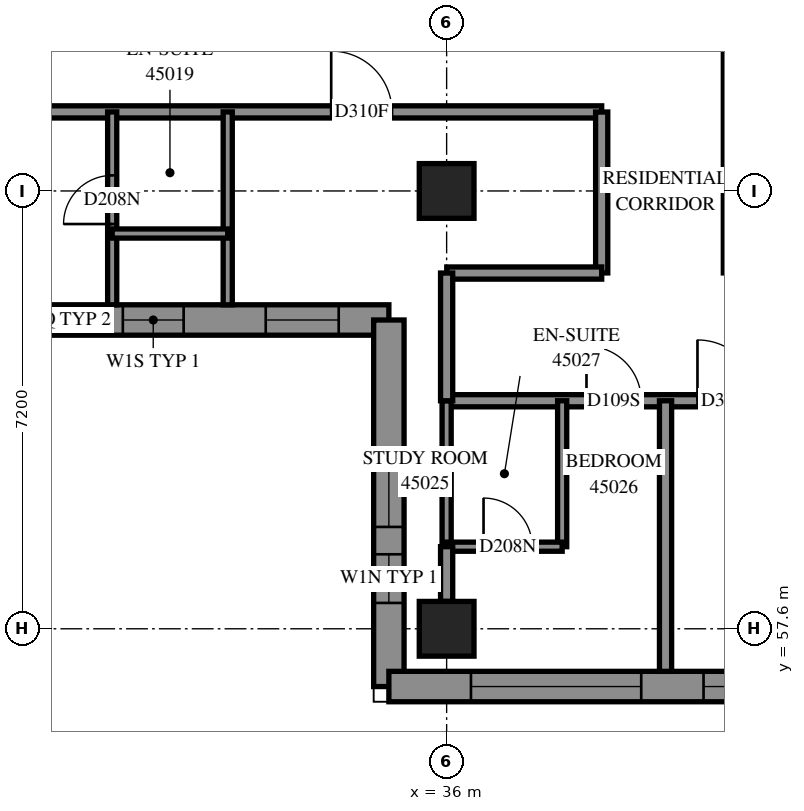
"""IFC4 building model, lengths in metres.
Left out: names, types, materials, properties, quantities, classifications, styles, units other than length and angle.
Written with IfcOpenShell. Run it as: python <this file> out.ifc"""

import sys

from ifc_helpers import new_model, si_unit, direction, frame, frame_2d, origin, origin_2d, place, context, subcontext, project, spatial, polyline, rectangle, outline, extrude, element, fill, save


model = new_model("IFC4")
c1 = context("Model", 3, precision=1e-05, world=origin(), true_north=direction((0.0, 1.0)))
c2 = subcontext(c1, "Body", "Model", "MODEL_VIEW")
j1 = project(units=[si_unit("LENGTHUNIT", "METRE"), si_unit("PLANEANGLEUNIT", "RADIAN")], contexts=[c1])
p1 = place(None, origin())
s1 = spatial("IfcSite", under=j1, at=p1, CompositionType="ELEMENT")
p2 = place(p1, origin())
s2 = spatial("IfcBuilding", under=s1, at=p2, CompositionType="ELEMENT")
p3 = place(p2, frame((0.0, 0.0, 166.0)))
s3 = spatial("IfcBuildingStorey", under=s2, at=p3, CompositionType="ELEMENT", Elevation=166.0)
for number, where, z_axis, x_axis in (
    (1, (36.0, 57.6, 0.0), (0.0, 0.0, 1.0), (1.0, 0.0, 0.0)),
    (2, (36.0, 64.8, 0.0), (0.0, 0.0, 1.0), (1.0, 0.0, 0.0)),
):
    element("IfcColumn", number, at=place(p3, frame(where, z_axis=z_axis, x_axis=x_axis)), inside=s3, PredefinedType="COLUMN", context=c2, shape_type="SweptSolid", body=[
        extrude(rectangle(XDim=0.9, YDim=0.9, at=origin_2d()), origin(), (0.0, 0.0, 1.0), 3.1),
    ])
p4 = place(p3, frame((19.478, 62.678, 0.0), z_axis=(0.0, 0.0, 1.0), x_axis=(1.0, 0.0, 0.0)))
e3 = element("IfcWall", 3, at=p4, inside=s3, PredefinedType="SOLIDWALL", context=c2, shape_type="SweptSolid", body=[
    extrude(outline(polyline([(-0.25, -0.25), (15.322, -0.25), (15.822, 0.25), (0.25, 0.25), (-0.25, -0.25)])), origin(), (0.0, 0.0, 1.0), 3.1),
])
p5 = place(p4, frame((2.522, 0.0, 0.45)))
e4 = element("IfcOpeningElement", 4, at=p5, cuts=e3, PredefinedType="OPENING", context=c2, shape_type="SweptSolid", body=[
    extrude(rectangle(XDim=2.8, YDim=2.5, at=frame_2d((1.4, 1.25))), frame((0.0, 0.26, 0.0), z_axis=(0.0, -1.0, 0.0), x_axis=(1.0, 0.0, 0.0)), (0.0, 0.0, 1.0), 0.52),
])
p6 = place(p4, frame((6.122, 0.0, 0.45)))
e5 = element("IfcOpeningElement", 5, at=p6, cuts=e3, PredefinedType="OPENING", context=c2, shape_type="SweptSolid", body=[
    extrude(rectangle(XDim=2.8, YDim=2.5, at=frame_2d((1.4, 1.25))), frame((0.0, 0.26, 0.0), z_axis=(0.0, -1.0, 0.0), x_axis=(1.0, 0.0, 0.0)), (0.0, 0.0, 1.0), 0.52),
])
p7 = place(p4, frame((0.686, 0.0, 0.45)))
e6 = element("IfcOpeningElement", 6, at=p7, cuts=e3, PredefinedType="OPENING", context=c2, shape_type="SweptSolid", body=[
    extrude(rectangle(XDim=1.2, YDim=2.5, at=frame_2d((0.6, 1.25))), frame((0.0, 0.26, 0.0), z_axis=(0.0, -1.0, 0.0), x_axis=(1.0, 0.0, 0.0)), (0.0, 0.0, 1.0), 0.52),
])
p8 = place(p4, frame((13.547, 0.0, 0.45)))
e7 = element("IfcOpeningElement", 7, at=p8, cuts=e3, PredefinedType="OPENING", context=c2, shape_type="SweptSolid", body=[
    extrude(rectangle(XDim=1.2, YDim=2.5, at=frame_2d((0.6, 1.25))), frame((0.0, 0.26, 0.0), z_axis=(0.0, -1.0, 0.0), x_axis=(1.0, 0.0, 0.0)), (0.0, 0.0, 1.0), 0.52),
])
p9 = place(p4, frame((9.547, 0.0, 0.45)))
e8 = element("IfcOpeningElement", 8, at=p9, cuts=e3, PredefinedType="OPENING", context=c2, shape_type="SweptSolid", body=[
    extrude(rectangle(XDim=1.3, YDim=2.5, at=frame_2d((0.65, 1.25))), frame((0.0, 0.26, 0.0), z_axis=(0.0, -1.0, 0.0), x_axis=(1.0, 0.0, 0.0)), (0.0, 0.0, 1.0), 0.52),
])
p10 = place(p4, frame((11.197, 0.0, 0.45)))
e9 = element("IfcOpeningElement", 9, at=p10, cuts=e3, PredefinedType="OPENING", context=c2, shape_type="SweptSolid", body=[
    extrude(rectangle(XDim=1.0, YDim=2.5, at=frame_2d((0.5, 1.25))), frame((0.0, 0.26, 0.0), z_axis=(0.0, -1.0, 0.0), x_axis=(1.0, 0.0, 0.0)), (0.0, 0.0, 1.0), 0.52),
])
p11 = place(p3, frame((35.05, 62.678, 0.0), z_axis=(0.0, 0.0, 1.0), x_axis=(0.0, -1.0, 0.0)))
e10 = element("IfcWall", 10, at=p11, inside=s3, PredefinedType="SOLIDWALL", context=c2, shape_type="SweptSolid", body=[
    extrude(outline(polyline([(0.25, -0.25), (6.278, -0.25), (5.778, 0.25), (-0.25, 0.25), (0.25, -0.25)])), origin(), (0.0, 0.0, 1.0), 3.1),
])
p12 = place(p11, frame((2.103, 0.0, 0.45)))
e11 = element("IfcOpeningElement", 11, at=p12, cuts=e10, PredefinedType="OPENING", context=c2, shape_type="SweptSolid", body=[
    extrude(rectangle(XDim=1.3, YDim=2.5, at=frame_2d((0.65, 1.25))), frame((0.0, 0.26, 0.0), z_axis=(0.0, -1.0, 0.0), x_axis=(1.0, 0.0, 0.0)), (0.0, 0.0, 1.0), 0.52),
])
p13 = place(p11, frame((3.853, 0.0, 0.45)))
e12 = element("IfcOpeningElement", 12, at=p13, cuts=e10, PredefinedType="OPENING", context=c2, shape_type="SweptSolid", body=[
    extrude(rectangle(XDim=0.8, YDim=2.5, at=frame_2d((0.4, 1.25))), frame((0.0, 0.26, 0.0), z_axis=(0.0, -1.0, 0.0), x_axis=(1.0, 0.0, 0.0)), (0.0, 0.0, 1.0), 0.52),
])
p14 = place(p3, frame((35.05, 56.65, 0.0), z_axis=(0.0, 0.0, 1.0), x_axis=(1.0, 0.0, 0.0)))
e13 = element("IfcWall", 13, at=p14, inside=s3, PredefinedType="SOLIDWALL", context=c2, shape_type="SweptSolid", body=[
    extrude(outline(polyline([(-0.25, -0.25), (6.95, -0.25), (7.45, 0.25), (0.25, 0.25), (-0.25, -0.25)])), origin(), (0.0, 0.0, 1.0), 3.1),
])
p15 = place(p14, frame((1.35, 0.0, 0.45)))
e14 = element("IfcOpeningElement", 14, at=p15, cuts=e13, PredefinedType="OPENING", context=c2, shape_type="SweptSolid", body=[
    extrude(rectangle(XDim=2.8, YDim=2.5, at=frame_2d((1.4, 1.25))), frame((0.0, 0.26, 0.0), z_axis=(0.0, -1.0, 0.0), x_axis=(1.0, 0.0, 0.0)), (0.0, 0.0, 1.0), 0.52),
])
p16 = place(p14, frame((5.175, 0.0, 0.45)))
e15 = element("IfcOpeningElement", 15, at=p16, cuts=e13, PredefinedType="OPENING", context=c2, shape_type="SweptSolid", body=[
    extrude(rectangle(XDim=1.2, YDim=2.5, at=frame_2d((0.6, 1.25))), frame((0.0, 0.26, 0.0), z_axis=(0.0, -1.0, 0.0), x_axis=(1.0, 0.0, 0.0)), (0.0, 0.0, 1.0), 0.52),
])
p17 = place(p3, frame((36.0, 61.35, 0.0), z_axis=(0.0, 0.0, 1.0), x_axis=(1.0, 0.0, 0.0)))
e16 = element("IfcWall", 16, at=p17, inside=s3, PredefinedType="PARTITIONING", context=c2, shape_type="SweptSolid", body=[
    extrude(rectangle(XDim=16.95, YDim=0.2, at=frame_2d((8.475, 0.0))), origin(), (0.0, 0.0, 1.0), 3.1),
])
p18 = place(p17, frame((2.3, 0.0, 0.0)))
e17 = element("IfcOpeningElement", 17, at=p18, cuts=e16, PredefinedType="OPENING", context=c2, shape_type="SweptSolid", body=[
    extrude(rectangle(XDim=0.9, YDim=2.1, at=frame_2d((0.45, 1.05))), frame((0.0, 0.11, 0.0), z_axis=(0.0, -1.0, 0.0), x_axis=(1.0, 0.0, 0.0)), (0.0, 0.0, 1.0), 0.22),
])
p19 = place(p17, frame((4.125, 0.0, 0.0)))
e18 = element("IfcOpeningElement", 18, at=p19, cuts=e16, PredefinedType="OPENING", context=c2, shape_type="SweptSolid", body=[
    extrude(rectangle(XDim=1.0, YDim=2.1, at=frame_2d((0.5, 1.05))), frame((0.0, 0.11, 0.0), z_axis=(0.0, -1.0, 0.0), x_axis=(1.0, 0.0, 0.0)), (0.0, 0.0, 1.0), 0.22),
])
p20 = place(p17, frame((9.5, 0.0, 0.0)))
e19 = element("IfcOpeningElement", 19, at=p20, cuts=e16, PredefinedType="OPENING", context=c2, shape_type="SweptSolid", body=[
    extrude(rectangle(XDim=0.9, YDim=2.1, at=frame_2d((0.45, 1.05))), frame((0.0, 0.11, 0.0), z_axis=(0.0, -1.0, 0.0), x_axis=(1.0, 0.0, 0.0)), (0.0, 0.0, 1.0), 0.22),
])
p21 = place(p17, frame((11.635, 0.0, 0.0)))
e20 = element("IfcOpeningElement", 20, at=p21, cuts=e16, PredefinedType="OPENING", context=c2, shape_type="SweptSolid", body=[
    extrude(rectangle(XDim=1.0, YDim=2.1, at=frame_2d((0.5, 1.05))), frame((0.0, 0.11, 0.0), z_axis=(0.0, -1.0, 0.0), x_axis=(1.0, 0.0, 0.0)), (0.0, 0.0, 1.0), 0.22),
])
p22 = place(p17, frame((15.803, 0.0, 0.0)))
e21 = element("IfcOpeningElement", 21, at=p22, cuts=e16, PredefinedType="OPENING", context=c2, shape_type="SweptSolid", body=[
    extrude(rectangle(XDim=1.0, YDim=2.1, at=frame_2d((0.5, 1.05))), frame((0.0, 0.11, 0.0), z_axis=(0.0, -1.0, 0.0), x_axis=(1.0, 0.0, 0.0)), (0.0, 0.0, 1.0), 0.22),
])
p23 = place(p3, frame((21.6, 66.1, 0.0), z_axis=(0.0, 0.0, 1.0), x_axis=(1.0, 0.0, 0.0)))
e22 = element("IfcWall", 22, at=p23, inside=s3, PredefinedType="PARTITIONING", context=c2, shape_type="SweptSolid", body=[
    extrude(rectangle(XDim=16.95, YDim=0.2, at=frame_2d((8.475, 0.0))), origin(), (0.0, 0.0, 1.0), 3.1),
])
p24 = place(p23, frame((0.546, 0.0, 0.0)))
e23 = element("IfcOpeningElement", 23, at=p24, cuts=e22, PredefinedType="OPENING", context=c2, shape_type="SweptSolid", body=[
    extrude(rectangle(XDim=0.9, YDim=2.1, at=frame_2d((0.45, 1.05))), frame((0.0, 0.11, 0.0), z_axis=(0.0, -1.0, 0.0), x_axis=(1.0, 0.0, 0.0)), (0.0, 0.0, 1.0), 0.22),
])
p25 = place(p23, frame((12.502, 0.0, 0.0)))
e24 = element("IfcOpeningElement", 24, at=p25, cuts=e22, PredefinedType="OPENING", context=c2, shape_type="SweptSolid", body=[
    extrude(rectangle(XDim=1.0, YDim=2.1, at=frame_2d((0.5, 1.05))), frame((0.0, 0.11, 0.0), z_axis=(0.0, -1.0, 0.0), x_axis=(1.0, 0.0, 0.0)), (0.0, 0.0, 1.0), 0.22),
])
p26 = place(p3, frame((40.65, 63.452, 0.0), z_axis=(0.0, 0.0, 1.0), x_axis=(0.0, 1.0, 0.0)))
e25 = element("IfcWall", 25, at=p26, inside=s3, PredefinedType="PARTITIONING", context=c2, shape_type="SweptSolid", body=[
    extrude(rectangle(XDim=4.748, YDim=0.2, at=frame_2d((2.374, 0.0))), origin(), (0.0, 0.0, 1.0), 3.1),
])
p27 = place(p3, frame((39.6, 56.9, 0.0), z_axis=(0.0, 0.0, 1.0), x_axis=(0.0, 1.0, 0.0)))
e26 = element("IfcWall", 26, at=p27, inside=s3, PredefinedType="PARTITIONING", context=c2, shape_type="SweptSolid", body=[
    extrude(rectangle(XDim=4.45, YDim=0.2, at=frame_2d((2.225, 0.0))), origin(), (0.0, 0.0, 1.0), 3.1),
])
p28 = place(p3, frame((32.4, 62.928, 0.0), z_axis=(0.0, 0.0, 1.0), x_axis=(0.0, 1.0, 0.0)))
e27 = element("IfcWall", 27, at=p28, inside=s3, PredefinedType="PARTITIONING", context=c2, shape_type="SweptSolid", body=[
    extrude(rectangle(XDim=3.172, YDim=0.15, at=frame_2d((1.586, 0.0))), origin(), (0.0, 0.0, 1.0), 3.1),
])
p29 = place(p3, frame((30.5, 62.928, 0.0), z_axis=(0.0, 0.0, 1.0), x_axis=(0.0, 1.0, 0.0)))
e28 = element("IfcWall", 28, at=p29, inside=s3, PredefinedType="PARTITIONING", context=c2, shape_type="SweptSolid", body=[
    extrude(rectangle(XDim=3.172, YDim=0.15, at=frame_2d((1.586, 0.0))), origin(), (0.0, 0.0, 1.0), 3.1),
])
p30 = place(p29, frame((1.328, 0.0, 0.0)))
e29 = element("IfcOpeningElement", 29, at=p30, cuts=e28, PredefinedType="OPENING", context=c2, shape_type="SweptSolid", body=[
    extrude(rectangle(XDim=0.8, YDim=2.1, at=frame_2d((0.4, 1.05))), frame((0.0, 0.085, 0.0), z_axis=(0.0, -1.0, 0.0), x_axis=(1.0, 0.0, 0.0)), (0.0, 0.0, 1.0), 0.17),
])
p31 = place(p3, frame((38.55, 63.452, 0.0), z_axis=(0.0, 0.0, 1.0), x_axis=(0.0, 1.0, 0.0)))
e30 = element("IfcWall", 30, at=p31, inside=s3, PredefinedType="PARTITIONING", context=c2, shape_type="SweptSolid", body=[
    extrude(rectangle(XDim=2.646, YDim=0.2, at=frame_2d((1.323, 0.0))), origin(), (0.0, 0.0, 1.0), 3.1),
])
p32 = place(p3, frame((36.002, 63.45, 0.0), z_axis=(0.0, 0.0, 1.0), x_axis=(1.0, 0.0, 0.0)))
e31 = element("IfcWall", 31, at=p32, inside=s3, PredefinedType="PARTITIONING", context=c2, shape_type="SweptSolid", body=[
    extrude(rectangle(XDim=2.548, YDim=0.2, at=frame_2d((1.274, 0.0))), origin(), (0.0, 0.0, 1.0), 3.1),
])
p33 = place(p3, frame((37.9, 58.95, 0.0), z_axis=(0.0, 0.0, 1.0), x_axis=(0.0, 1.0, 0.0)))
e32 = element("IfcWall", 32, at=p33, inside=s3, PredefinedType="PARTITIONING", context=c2, shape_type="SweptSolid", body=[
    extrude(rectangle(XDim=2.4, YDim=0.15, at=frame_2d((1.2, 0.0))), origin(), (0.0, 0.0, 1.0), 3.1),
])
p34 = place(p3, frame((36.0, 58.95, 0.0), z_axis=(0.0, 0.0, 1.0), x_axis=(0.0, 1.0, 0.0)))
e33 = element("IfcWall", 33, at=p34, inside=s3, PredefinedType="PARTITIONING", context=c2, shape_type="SweptSolid", body=[
    extrude(rectangle(XDim=2.4, YDim=0.15, at=frame_2d((1.2, 0.0))), origin(), (0.0, 0.0, 1.0), 2.6),
])
p35 = place(p3, frame((36.0, 61.35, 0.0), z_axis=(0.0, 0.0, 1.0), x_axis=(0.0, 1.0, 0.0)))
e34 = element("IfcWall", 34, at=p35, inside=s3, PredefinedType="PARTITIONING", context=c2, shape_type="SweptSolid", body=[
    extrude(rectangle(XDim=2.1, YDim=0.2, at=frame_2d((1.05, 0.0))), origin(), (0.0, 0.0, 1.0), 2.6),
])
p36 = place(p3, frame((30.5, 64.1, 0.0), z_axis=(0.0, 0.0, 1.0), x_axis=(1.0, 0.0, 0.0)))
e35 = element("IfcWall", 35, at=p36, inside=s3, PredefinedType="PARTITIONING", context=c2, shape_type="SweptSolid", body=[
    extrude(rectangle(XDim=1.9, YDim=0.15, at=frame_2d((0.95, 0.0))), origin(), (0.0, 0.0, 1.0), 3.1),
])
p37 = place(p3, frame((36.0, 58.95, 0.0), z_axis=(0.0, 0.0, 1.0), x_axis=(1.0, 0.0, 0.0)))
e36 = element("IfcWall", 36, at=p37, inside=s3, PredefinedType="PARTITIONING", context=c2, shape_type="SweptSolid", body=[
    extrude(rectangle(XDim=1.9, YDim=0.15, at=frame_2d((0.95, 0.0))), origin(), (0.0, 0.0, 1.0), 3.1),
])
p38 = place(p37, frame((0.607, 0.0, 0.0)))
e37 = element("IfcOpeningElement", 37, at=p38, cuts=e36, PredefinedType="OPENING", context=c2, shape_type="SweptSolid", body=[
    extrude(rectangle(XDim=0.8, YDim=2.1, at=frame_2d((0.4, 1.05))), frame((0.0, 0.085, 0.0), z_axis=(0.0, -1.0, 0.0), x_axis=(1.0, 0.0, 0.0)), (0.0, 0.0, 1.0), 0.17),
])
p39 = place(p3, frame((36.0, 58.05, 0.0), z_axis=(0.0, 0.0, 1.0), x_axis=(0.0, 1.0, 0.0)))
e38 = element("IfcWall", 38, at=p39, inside=s3, PredefinedType="PARTITIONING", context=c2, shape_type="SweptSolid", body=[
    extrude(rectangle(XDim=0.9, YDim=0.2, at=frame_2d((0.45, 0.0))), origin(), (0.0, 0.0, 1.0), 2.6),
])
p40 = place(p8, origin())
e39 = element("IfcWindow", 39, at=p40, inside=s3, PartitioningType="SINGLE_PANEL", PredefinedType="WINDOW", context=c2, shape_type="SweptSolid", body=[
    extrude(rectangle(XDim=1.2, YDim=2.5, at=frame_2d((0.6, 1.25))), frame((0.0, 0.18, 0.0), z_axis=(0.0, -1.0, 0.0), x_axis=(1.0, 0.0, 0.0)), (0.0, 0.0, 1.0), 0.06),
])
fill(e7, e39)
p41 = place(p15, origin())
e40 = element("IfcWindow", 40, at=p41, inside=s3, PartitioningType="SINGLE_PANEL", PredefinedType="WINDOW", context=c2, shape_type="SweptSolid", body=[
    extrude(rectangle(XDim=2.8, YDim=2.5, at=frame_2d((1.4, 1.25))), frame((0.0, 0.18, 0.0), z_axis=(0.0, -1.0, 0.0), x_axis=(1.0, 0.0, 0.0)), (0.0, 0.0, 1.0), 0.06),
])
fill(e14, e40)
p42 = place(p16, origin())
e41 = element("IfcWindow", 41, at=p42, inside=s3, PartitioningType="SINGLE_PANEL", PredefinedType="WINDOW", context=c2, shape_type="SweptSolid", body=[
    extrude(rectangle(XDim=1.2, YDim=2.5, at=frame_2d((0.6, 1.25))), frame((0.0, 0.18, 0.0), z_axis=(0.0, -1.0, 0.0), x_axis=(1.0, 0.0, 0.0)), (0.0, 0.0, 1.0), 0.06),
])
fill(e15, e41)
p43 = place(p30, origin())
e42 = element("IfcDoor", 42, at=p43, inside=s3, OperationType="SINGLE_SWING_RIGHT", PredefinedType="DOOR", context=c2, shape_type="SweptSolid", body=[
    extrude(rectangle(XDim=0.8, YDim=2.1, at=frame_2d((0.4, 1.05))), frame((0.0, 0.025, 0.0), z_axis=(0.0, -1.0, 0.0), x_axis=(1.0, 0.0, 0.0)), (0.0, 0.0, 1.0), 0.05),
])
fill(e29, e42)
p44 = place(p25, origin())
e43 = element("IfcDoor", 43, at=p44, inside=s3, OperationType="SINGLE_SWING_RIGHT", PredefinedType="DOOR", context=c2, shape_type="SweptSolid", body=[
    extrude(rectangle(XDim=1.0, YDim=2.1, at=frame_2d((0.5, 1.05))), frame((0.0, 0.025, 0.0), z_axis=(0.0, -1.0, 0.0), x_axis=(1.0, 0.0, 0.0)), (0.0, 0.0, 1.0), 0.05),
])
fill(e24, e43)
p45 = place(p18, origin())
e44 = element("IfcDoor", 44, at=p45, inside=s3, OperationType="SINGLE_SWING_LEFT", PredefinedType="DOOR", context=c2, shape_type="SweptSolid", body=[
    extrude(rectangle(XDim=0.9, YDim=2.1, at=frame_2d((0.45, 1.05))), frame((0.0, 0.025, 0.0), z_axis=(0.0, -1.0, 0.0), x_axis=(1.0, 0.0, 0.0)), (0.0, 0.0, 1.0), 0.05),
])
fill(e17, e44)
p46 = place(p38, origin())
e45 = element("IfcDoor", 45, at=p46, inside=s3, OperationType="SINGLE_SWING_RIGHT", PredefinedType="DOOR", context=c2, shape_type="SweptSolid", body=[
    extrude(rectangle(XDim=0.8, YDim=2.1, at=frame_2d((0.4, 1.05))), frame((0.0, 0.025, 0.0), z_axis=(0.0, -1.0, 0.0), x_axis=(1.0, 0.0, 0.0)), (0.0, 0.0, 1.0), 0.05),
])
fill(e37, e45)
p47 = place(p19, origin())
e46 = element("IfcDoor", 46, at=p47, inside=s3, OperationType="SINGLE_SWING_RIGHT", PredefinedType="DOOR", context=c2, shape_type="SweptSolid", body=[
    extrude(rectangle(XDim=1.0, YDim=2.1, at=frame_2d((0.5, 1.05))), frame((0.0, 0.025, 0.0), z_axis=(0.0, -1.0, 0.0), x_axis=(1.0, 0.0, 0.0)), (0.0, 0.0, 1.0), 0.05),
])
fill(e18, e46)
p48 = place(p9, origin())
e47 = element("IfcWindow", 47, at=p48, inside=s3, PartitioningType="SINGLE_PANEL", PredefinedType="WINDOW", context=c2, shape_type="SweptSolid", body=[
    extrude(rectangle(XDim=1.3, YDim=2.5, at=frame_2d((0.65, 1.25))), frame((0.0, 0.18, 0.0), z_axis=(0.0, -1.0, 0.0), x_axis=(1.0, 0.0, 0.0)), (0.0, 0.0, 1.0), 0.06),
])
fill(e8, e47)
p49 = place(p10, origin())
e48 = element("IfcWindow", 48, at=p49, inside=s3, PartitioningType="SINGLE_PANEL", PredefinedType="WINDOW", context=c2, shape_type="SweptSolid", body=[
    extrude(rectangle(XDim=1.0, YDim=2.5, at=frame_2d((0.5, 1.25))), frame((0.0, 0.18, 0.0), z_axis=(0.0, -1.0, 0.0), x_axis=(1.0, 0.0, 0.0)), (0.0, 0.0, 1.0), 0.06),
])
fill(e9, e48)
p50 = place(p12, origin())
e49 = element("IfcWindow", 49, at=p50, inside=s3, PartitioningType="SINGLE_PANEL", PredefinedType="WINDOW", context=c2, shape_type="SweptSolid", body=[
    extrude(rectangle(XDim=1.3, YDim=2.5, at=frame_2d((0.65, 1.25))), frame((0.0, 0.18, 0.0), z_axis=(0.0, -1.0, 0.0), x_axis=(1.0, 0.0, 0.0)), (0.0, 0.0, 1.0), 0.06),
])
fill(e11, e49)
p51 = place(p13, origin())
e50 = element("IfcWindow", 50, at=p51, inside=s3, PartitioningType="SINGLE_PANEL", PredefinedType="WINDOW", context=c2, shape_type="SweptSolid", body=[
    extrude(rectangle(XDim=0.8, YDim=2.5, at=frame_2d((0.4, 1.25))), frame((0.0, 0.18, 0.0), z_axis=(0.0, -1.0, 0.0), x_axis=(1.0, 0.0, 0.0)), (0.0, 0.0, 1.0), 0.06),
])
fill(e12, e50)
save(model, sys.argv[1])
